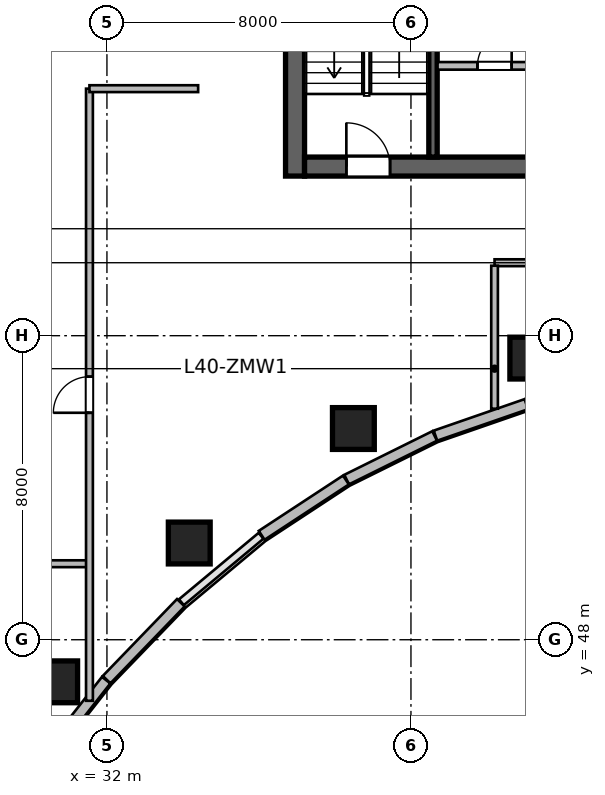
"""IFC4 building model, lengths in metres.
Left out: names, types, materials, properties, quantities, classifications, styles, units other than length and angle.
Written with IfcOpenShell. Run it as: python <this file> out.ifc"""

import sys

from ifc_helpers import new_model, si_unit, direction, frame, frame_2d, origin, origin_2d, place, context, subcontext, project, spatial, rectangle, circle, extrude, source, transform, mapped, element, fill, save


model = new_model("IFC4")
c1 = context("Model", 3, precision=1e-05, world=origin(), true_north=direction((0.0, 1.0)))
c2 = subcontext(c1, "Body", "Model", "MODEL_VIEW")
j1 = project(units=[si_unit("LENGTHUNIT", "METRE"), si_unit("PLANEANGLEUNIT", "RADIAN")], contexts=[c1])
p1 = place(None, origin())
s1 = spatial("IfcSite", under=j1, at=p1, CompositionType="ELEMENT")
p2 = place(p1, origin())
s2 = spatial("IfcBuilding", under=s1, at=p2, CompositionType="ELEMENT")
p3 = place(p2, frame((0.0, 0.0, 166.2)))
s3 = spatial("IfcBuildingStorey", under=s2, at=p3, CompositionType="ELEMENT", Elevation=166.2)
m1 = source(origin(), c2, "Body", "SweptSolid", [
    extrude(rectangle(XDim=12.0, YDim=0.5, at=frame_2d((6.0, 0.0))), origin(), (0.0, 0.0, 1.0), 3.9),
])
p4 = place(p3, frame((36.95, 60.2, 0.0), z_axis=(0.0, 0.0, 1.0), x_axis=(0.0, 1.0, 0.0)))
e1 = element("IfcWall", 1, at=p4, inside=s3, PredefinedType="SHEAR", context=c2, shape_type="MappedRepresentation", body=[
    mapped(m1, transform((0.0, 0.0, 0.0), scale=1.0)),
])
m2 = source(origin(), c2, "Body", "SweptSolid", [
    extrude(rectangle(XDim=21.6, YDim=0.5, at=frame_2d((10.8, 0.0))), origin(), (0.0, 0.0, 1.0), 3.9),
])
p5 = place(p3, frame((37.2, 60.45, 0.0), z_axis=(0.0, 0.0, 1.0), x_axis=(1.0, 0.0, 0.0)))
e2 = element("IfcWall", 2, at=p5, inside=s3, PredefinedType="SHEAR", context=c2, shape_type="MappedRepresentation", body=[
    mapped(m2, transform((0.0, 0.0, 0.0), scale=1.0)),
])
p6 = place(p5, frame((1.1, 0.0, 0.0)))
e3 = element("IfcOpeningElement", 3, at=p6, cuts=e2, PredefinedType="OPENING", context=c2, shape_type="SweptSolid", body=[
    extrude(rectangle(XDim=1.15, YDim=2.15, at=frame_2d((0.575, 1.075))), frame((0.0, 0.26, 0.0), z_axis=(0.0, -1.0, 0.0), x_axis=(1.0, 0.0, 0.0)), (0.0, 0.0, 1.0), 0.52),
])
p7 = place(p5, frame((19.5, 0.0, 0.0)))
e4 = element("IfcOpeningElement", 4, at=p7, cuts=e2, PredefinedType="OPENING", context=c2, shape_type="SweptSolid", body=[
    extrude(rectangle(XDim=0.9, YDim=2.1, at=frame_2d((0.45, 1.05))), frame((0.0, 0.26, 0.0), z_axis=(0.0, -1.0, 0.0), x_axis=(1.0, 0.0, 0.0)), (0.0, 0.0, 1.0), 0.52),
])
p8 = place(p5, frame((12.02, 0.0, 0.0)))
e5 = element("IfcOpeningElement", 5, at=p8, cuts=e2, PredefinedType="OPENING", context=c2, shape_type="SweptSolid", body=[
    extrude(rectangle(XDim=1.6, YDim=2.15, at=frame_2d((0.8, 1.075))), frame((0.0, 0.26, 0.0), z_axis=(0.0, -1.0, 0.0), x_axis=(1.0, 0.0, 0.0)), (0.0, 0.0, 1.0), 0.52),
])
m3 = source(origin(), c2, "Body", "SweptSolid", [
    extrude(rectangle(XDim=11.0, YDim=0.22, at=frame_2d((5.5, 0.0))), origin(), (0.0, 0.0, 1.0), 3.9),
])
p9 = place(p3, frame((40.58, 60.7, 0.0), z_axis=(0.0, 0.0, 1.0), x_axis=(0.0, 1.0, 0.0)))
e6 = element("IfcWall", 6, at=p9, inside=s3, PredefinedType="SHEAR", context=c2, shape_type="MappedRepresentation", body=[
    mapped(m3, transform((0.0, 0.0, 0.0), scale=1.0)),
])
m4 = source(origin(), c2, "Body", "SweptSolid", [
    extrude(circle(Radius=0.55, at=origin_2d()), origin(), (0.0, 0.0, 1.0), 3.9),
])
for number, where, z_axis, x_axis in (
    (7, (30.677, 46.892, 0.0), (0.0, 0.0, 1.0), (-0.571, 0.821, 0.0)),
    (8, (34.166, 50.545, 0.0), (0.0, 0.0, 1.0), (-0.436, 0.9, 0.0)),
    (9, (38.485, 53.558, 0.0), (0.0, 0.0, 1.0), (-0.289, 0.957, 0.0)),
    (10, (43.154, 55.411, 0.0), (0.0, 0.0, 1.0), (-0.143, 0.99, 0.0)),
):
    element("IfcColumn", number, at=place(p3, frame(where, z_axis=z_axis, x_axis=x_axis)), inside=s3, PredefinedType="COLUMN", context=c2, shape_type="MappedRepresentation", body=[
        mapped(m4, transform((0.0, 0.0, 0.0), scale=1.0)),
    ])
m5 = source(origin(), c2, "Body", "SweptSolid", [
    extrude(rectangle(XDim=2.53, YDim=0.28, at=frame_2d((1.265, 0.0))), origin(), (0.0, 0.0, 1.0), 3.65),
])
p10 = place(p3, frame((43.035, 54.198, 0.0), z_axis=(0.0, 0.0, 1.0), x_axis=(-0.944872429646, -0.327438683872, 0.0)))
e11 = element("IfcWall", 11, at=p10, inside=s3, PredefinedType="SOLIDWALL", context=c2, shape_type="MappedRepresentation", body=[
    mapped(m5, transform((0.0, 0.0, 0.0), scale=1.0)),
])
m6 = source(origin(), c2, "Body", "SweptSolid", [
    extrude(rectangle(XDim=2.584, YDim=0.28, at=frame_2d((1.292, 0.0))), origin(), (0.0, 0.0, 1.0), 3.65),
])
p11 = place(p3, frame((40.624, 53.361, 0.0), z_axis=(0.0, 0.0, 1.0), x_axis=(-0.895989792847, -0.44407464588, 0.0)))
e12 = element("IfcWall", 12, at=p11, inside=s3, PredefinedType="SOLIDWALL", context=c2, shape_type="MappedRepresentation", body=[
    mapped(m6, transform((0.0, 0.0, 0.0), scale=1.0)),
])
m7 = source(origin(), c2, "Body", "SweptSolid", [
    extrude(rectangle(XDim=2.652, YDim=0.28, at=frame_2d((1.326, 0.0))), origin(), (0.0, 0.0, 1.0), 3.65),
])
p12 = place(p3, frame((38.289, 52.202, 0.0), z_axis=(0.0, 0.0, 1.0), x_axis=(-0.836008323535, -0.54871676025, 0.0)))
e13 = element("IfcWall", 13, at=p12, inside=s3, PredefinedType="SOLIDWALL", context=c2, shape_type="MappedRepresentation", body=[
    mapped(m7, transform((0.0, 0.0, 0.0), scale=1.0)),
])
m8 = source(origin(), c2, "Body", "SweptSolid", [
    extrude(rectangle(XDim=2.812, YDim=0.28, at=frame_2d((1.406, 0.0))), origin(), (0.0, 0.0, 1.0), 3.65),
])
p13 = place(p3, frame((33.945, 48.973, 0.0), z_axis=(0.0, 0.0, 1.0), x_axis=(-0.694583668785, -0.719411931411, 0.0)))
e14 = element("IfcWall", 14, at=p13, inside=s3, PredefinedType="SOLIDWALL", context=c2, shape_type="MappedRepresentation", body=[
    mapped(m8, transform((0.0, 0.0, 0.0), scale=1.0)),
])
m9 = source(origin(), c2, "Body", "SweptSolid", [
    extrude(rectangle(XDim=2.897, YDim=0.28, at=frame_2d((1.448, 0.0))), origin(), (0.0, 0.0, 1.0), 3.65),
])
p14 = place(p3, frame((31.979, 46.936, 0.0), z_axis=(0.0, 0.0, 1.0), x_axis=(-0.618167636915, -0.786046291685, 0.0)))
e15 = element("IfcWall", 15, at=p14, inside=s3, PredefinedType="SOLIDWALL", context=c2, shape_type="MappedRepresentation", body=[
    mapped(m9, transform((0.0, 0.0, 0.0), scale=1.0)),
])
m10 = source(origin(), c2, "Body", "SweptSolid", [
    extrude(rectangle(XDim=8.02, YDim=0.2, at=frame_2d((4.01, 0.0))), origin(), (0.0, 0.0, 1.0), 3.65),
])
p15 = place(p3, frame((40.7, 63.1, 0.0), z_axis=(0.0, 0.0, 1.0), x_axis=(1.0, 0.0, 0.0)))
e16 = element("IfcWall", 16, at=p15, inside=s3, PredefinedType="SOLIDWALL", context=c2, shape_type="MappedRepresentation", body=[
    mapped(m10, transform((0.0, 0.0, 0.0), scale=1.0)),
])
p16 = place(p15, frame((1.05, 0.0, 0.0)))
e17 = element("IfcOpeningElement", 17, at=p16, cuts=e16, PredefinedType="OPENING", context=c2, shape_type="SweptSolid", body=[
    extrude(rectangle(XDim=0.9, YDim=2.1, at=frame_2d((0.45, 1.05))), frame((0.0, 0.11, 0.0), z_axis=(0.0, -1.0, 0.0), x_axis=(1.0, 0.0, 0.0)), (0.0, 0.0, 1.0), 0.22),
])
p17 = place(p15, frame((4.99, 0.0, 0.0)))
e18 = element("IfcOpeningElement", 18, at=p17, cuts=e16, PredefinedType="OPENING", context=c2, shape_type="SweptSolid", body=[
    extrude(rectangle(XDim=0.9, YDim=2.1, at=frame_2d((0.45, 1.05))), frame((0.0, 0.11, 0.0), z_axis=(0.0, -1.0, 0.0), x_axis=(1.0, 0.0, 0.0)), (0.0, 0.0, 1.0), 0.22),
])
m11 = source(origin(), c2, "Body", "SweptSolid", [
    extrude(rectangle(XDim=4.176, YDim=0.18, at=frame_2d((2.088, 0.0))), origin(), (0.0, 0.0, 1.0), 3.65),
])
p18 = place(p3, frame((42.2, 57.92, 0.0), z_axis=(0.0, 0.0, 1.0), x_axis=(1.0, 0.0, 0.0)))
e19 = element("IfcWall", 19, at=p18, inside=s3, PredefinedType="PLUMBINGWALL", context=c2, shape_type="MappedRepresentation", body=[
    mapped(m11, transform((0.0, 0.0, 0.0), scale=1.0)),
])
p19 = place(p18, frame((1.638, 0.0, 0.0)))
e20 = element("IfcOpeningElement", 20, at=p19, cuts=e19, PredefinedType="OPENING", context=c2, shape_type="SweptSolid", body=[
    extrude(rectangle(XDim=0.9, YDim=2.08, at=frame_2d((0.45, 1.04))), frame((0.0, 0.1, 0.0), z_axis=(0.0, -1.0, 0.0), x_axis=(1.0, 0.0, 0.0)), (0.0, 0.0, 1.0), 0.2),
])
m12 = source(origin(), c2, "Body", "SweptSolid", [
    extrude(rectangle(XDim=3.763, YDim=0.175, at=frame_2d((1.881, 0.0))), origin(), (0.0, 0.0, 1.0), 3.65),
])
p20 = place(p3, frame((42.2, 54.079, 0.0), z_axis=(0.0, 0.0, 1.0), x_axis=(0.0, 1.0, 0.0)))
e21 = element("IfcWall", 21, at=p20, inside=s3, PredefinedType="PARTITIONING", context=c2, shape_type="MappedRepresentation", body=[
    mapped(m12, transform((0.0, 0.0, 0.0), scale=1.0)),
])
m13 = source(origin(), c2, "Body", "SweptSolid", [
    extrude(rectangle(XDim=2.5, YDim=0.18, at=frame_2d((1.25, 0.0))), origin(), (0.0, 0.0, 1.0), 3.65),
])
p21 = place(p3, frame((29.0, 50.0, 0.0), z_axis=(0.0, 0.0, 1.0), x_axis=(1.0, 0.0, 0.0)))
e22 = element("IfcWall", 22, at=p21, inside=s3, PredefinedType="PLUMBINGWALL", context=c2, shape_type="MappedRepresentation", body=[
    mapped(m13, transform((0.0, 0.0, 0.0), scale=1.0)),
])
m14 = source(origin(), c2, "Body", "SweptSolid", [
    extrude(rectangle(XDim=16.106, YDim=0.18, at=frame_2d((8.053, 0.0))), origin(), (0.0, 0.0, 1.0), 2.942),
])
p22 = place(p3, frame((31.54, 46.394, 0.0), z_axis=(0.0, 0.0, 1.0), x_axis=(0.0, 1.0, 0.0)))
e23 = element("IfcWall", 23, at=p22, inside=s3, PredefinedType="PLUMBINGWALL", context=c2, shape_type="MappedRepresentation", body=[
    mapped(m14, transform((0.0, 0.0, 0.0), scale=1.0)),
])
p23 = place(p22, frame((7.578, 0.0, 0.0)))
e24 = element("IfcOpeningElement", 24, at=p23, cuts=e23, PredefinedType="OPENING", context=c2, shape_type="SweptSolid", body=[
    extrude(rectangle(XDim=0.95, YDim=2.1, at=frame_2d((0.475, 1.05))), frame((0.0, 0.1, 0.0), z_axis=(0.0, -1.0, 0.0), x_axis=(1.0, 0.0, 0.0)), (0.0, 0.0, 1.0), 0.2),
])
m15 = source(origin(), c2, "Body", "SweptSolid", [
    extrude(rectangle(XDim=2.86, YDim=0.18, at=frame_2d((1.43, 0.0))), origin(), (0.0, 0.0, 1.0), 3.65),
])
p24 = place(p3, frame((31.54, 62.5, 0.0), z_axis=(0.0, 0.0, 1.0), x_axis=(1.0, 0.0, 0.0)))
e25 = element("IfcWall", 25, at=p24, inside=s3, PredefinedType="PLUMBINGWALL", context=c2, shape_type="MappedRepresentation", body=[
    mapped(m15, transform((0.0, 0.0, 0.0), scale=1.0)),
])
m16 = source(origin(), c2, "Body", "SweptSolid", [
    extrude(rectangle(XDim=1.15, YDim=2.15, at=frame_2d((0.575, 1.075))), frame((0.0, 0.025, 0.0), z_axis=(0.0, -1.0, 0.0), x_axis=(1.0, 0.0, 0.0)), (0.0, 0.0, 1.0), 0.05),
])
p25 = place(p6, origin())
e26 = element("IfcDoor", 26, at=p25, inside=s3, OperationType="SINGLE_SWING_LEFT", PredefinedType="DOOR", context=c2, shape_type="MappedRepresentation", body=[
    mapped(m16, transform((0.0, 0.0, 0.0), scale=1.0)),
])
fill(e3, e26)
m17 = source(origin(), c2, "Body", "SweptSolid", [
    extrude(rectangle(XDim=0.9, YDim=2.1, at=frame_2d((0.45, 1.05))), frame((0.0, 0.025, 0.0), z_axis=(0.0, -1.0, 0.0), x_axis=(1.0, 0.0, 0.0)), (0.0, 0.0, 1.0), 0.05),
])
p26 = place(p16, origin())
e27 = element("IfcDoor", 27, at=p26, inside=s3, OperationType="SINGLE_SWING_RIGHT", PredefinedType="DOOR", context=c2, shape_type="MappedRepresentation", body=[
    mapped(m17, transform((0.0, 0.0, 0.0), scale=1.0)),
])
fill(e17, e27)
m18 = source(origin(), c2, "Body", "SweptSolid", [
    extrude(rectangle(XDim=0.95, YDim=2.1, at=frame_2d((0.475, 1.05))), frame((0.0, 0.025, 0.0), z_axis=(0.0, -1.0, 0.0), x_axis=(1.0, 0.0, 0.0)), (0.0, 0.0, 1.0), 0.05),
])
p27 = place(p23, origin())
e28 = element("IfcDoor", 28, at=p27, inside=s3, OperationType="SINGLE_SWING_LEFT", PredefinedType="DOOR", context=c2, shape_type="MappedRepresentation", body=[
    mapped(m18, transform((0.0, 0.0, 0.0), scale=1.0)),
])
fill(e24, e28)
save(model, sys.argv[1])
